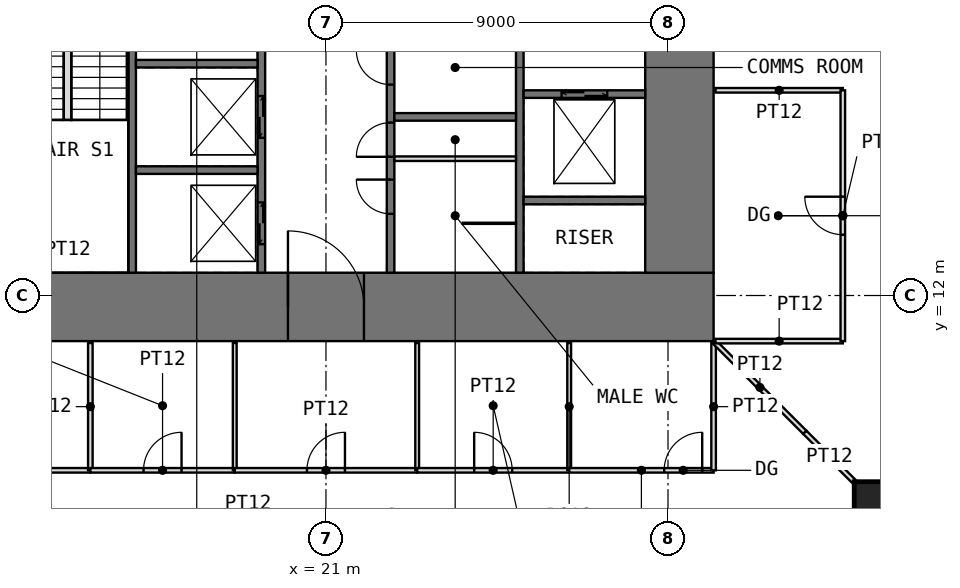
"""IFC4 building model, lengths in metres.
Left out: names, types, materials, properties, quantities, classifications, styles, units other than length and angle.
Written with IfcOpenShell. Run it as: python <this file> out.ifc"""

import sys

from ifc_helpers import new_model, si_unit, direction, frame, frame_2d, origin, origin_2d, place, context, subcontext, project, spatial, rectangle, extrude, element, fill, save


model = new_model("IFC4")
c1 = context("Model", 3, precision=1e-05, world=origin(), true_north=direction((0.0, 1.0)))
c2 = subcontext(c1, "Body", "Model", "MODEL_VIEW")
j1 = project(units=[si_unit("LENGTHUNIT", "METRE"), si_unit("PLANEANGLEUNIT", "RADIAN")], contexts=[c1])
p1 = place(None, origin())
s1 = spatial("IfcSite", under=j1, at=p1, CompositionType="ELEMENT")
p2 = place(p1, origin())
s2 = spatial("IfcBuilding", under=s1, at=p2, CompositionType="ELEMENT")
p3 = place(p2, frame((0.0, 0.0, 46.5)))
s3 = spatial("IfcBuildingStorey", under=s2, at=p3, CompositionType="ELEMENT", Elevation=46.5)
p4 = place(p3, frame((35.45, 6.55, 0.0), z_axis=(0.0, 0.0, 1.0), x_axis=(1.0, 0.0, 0.0)))
e1 = element("IfcColumn", 1, at=p4, inside=s3, PredefinedType="COLUMN", context=c2, shape_type="SweptSolid", body=[
    extrude(rectangle(XDim=1.1, YDim=1.1, at=origin_2d()), origin(), (0.0, 0.0, 1.0), 4.0),
])
p5 = place(p3, frame((10.8, 11.7, -0.05), z_axis=(0.0, 0.0, 1.0), x_axis=(1.0, 0.0, 0.0)))
e2 = element("IfcWall", 2, at=p5, inside=s3, PredefinedType="SHEAR", context=c2, shape_type="SweptSolid", body=[
    extrude(rectangle(XDim=20.4, YDim=1.8, at=frame_2d((10.2, 0.0))), origin(), (0.0, 0.0, 1.0), 4.0),
])
p6 = place(p5, frame((9.2, 0.0, 0.05)))
e3 = element("IfcOpeningElement", 3, at=p6, cuts=e2, PredefinedType="OPENING", context=c2, shape_type="SweptSolid", body=[
    extrude(rectangle(XDim=2.0, YDim=2.2, at=frame_2d((1.0, 1.1))), frame((0.0, 0.91, 0.0), z_axis=(0.0, -1.0, 0.0), x_axis=(1.0, 0.0, 0.0)), (0.0, 0.0, 1.0), 1.82),
])
p7 = place(p3, frame((30.3, 12.6, -0.05), z_axis=(0.0, 0.0, 1.0), x_axis=(0.0, 1.0, 0.0)))
e4 = element("IfcWall", 4, at=p7, inside=s3, PredefinedType="SHEAR", context=c2, shape_type="SweptSolid", body=[
    extrude(rectangle(XDim=16.8, YDim=1.8, at=frame_2d((8.4, 0.0))), origin(), (0.0, 0.0, 1.0), 4.0),
])
p8 = place(p7, frame((5.9, 0.0, 0.05)))
e5 = element("IfcOpeningElement", 5, at=p8, cuts=e4, PredefinedType="OPENING", context=c2, shape_type="SweptSolid", body=[
    extrude(rectangle(XDim=1.0, YDim=2.2, at=frame_2d((0.5, 1.1))), frame((0.0, 0.91, 0.0), z_axis=(0.0, -1.0, 0.0), x_axis=(1.0, 0.0, 0.0)), (0.0, 0.0, 1.0), 1.82),
])
p9 = place(p3, frame((15.9, 12.6, -0.05), z_axis=(0.0, 0.0, 1.0), x_axis=(0.0, 1.0, 0.0)))
e6 = element("IfcWall", 6, at=p9, inside=s3, PredefinedType="SHEAR", context=c2, shape_type="SweptSolid", body=[
    extrude(rectangle(XDim=16.8, YDim=0.2, at=frame_2d((8.4, 0.0))), origin(), (0.0, 0.0, 1.0), 4.0),
])
p10 = place(p9, frame((8.9, 0.0, 0.05)))
e7 = element("IfcOpeningElement", 7, at=p10, cuts=e6, PredefinedType="OPENING", context=c2, shape_type="SweptSolid", body=[
    extrude(rectangle(XDim=1.0, YDim=2.2, at=frame_2d((0.5, 1.1))), frame((0.0, 0.11, 0.0), z_axis=(0.0, -1.0, 0.0), x_axis=(1.0, 0.0, 0.0)), (0.0, 0.0, 1.0), 0.22),
])
p11 = place(p3, frame((19.3, 12.6, -0.05), z_axis=(0.0, 0.0, 1.0), x_axis=(0.0, 1.0, 0.0)))
e8 = element("IfcWall", 8, at=p11, inside=s3, PredefinedType="SHEAR", context=c2, shape_type="SweptSolid", body=[
    extrude(rectangle(XDim=16.8, YDim=0.2, at=frame_2d((8.4, 0.0))), origin(), (0.0, 0.0, 1.0), 4.0),
])
p12 = place(p11, frame((8.7, 0.0, 0.05)))
e9 = element("IfcOpeningElement", 9, at=p12, cuts=e8, PredefinedType="OPENING", context=c2, shape_type="SweptSolid", body=[
    extrude(rectangle(XDim=1.0, YDim=2.2, at=frame_2d((0.5, 1.1))), frame((0.0, 0.11, 0.0), z_axis=(0.0, -1.0, 0.0), x_axis=(1.0, 0.0, 0.0)), (0.0, 0.0, 1.0), 0.22),
])
p13 = place(p11, frame((10.85, 0.0, 0.05)))
e10 = element("IfcOpeningElement", 10, at=p13, cuts=e8, PredefinedType="OPENING", context=c2, shape_type="SweptSolid", body=[
    extrude(rectangle(XDim=0.9, YDim=2.2, at=frame_2d((0.45, 1.1))), frame((0.0, 0.11, 0.0), z_axis=(0.0, -1.0, 0.0), x_axis=(1.0, 0.0, 0.0)), (0.0, 0.0, 1.0), 0.22),
])
p14 = place(p11, frame((13.3, 0.0, 0.05)))
e11 = element("IfcOpeningElement", 11, at=p14, cuts=e8, PredefinedType="OPENING", context=c2, shape_type="SweptSolid", body=[
    extrude(rectangle(XDim=1.0, YDim=2.2, at=frame_2d((0.5, 1.1))), frame((0.0, 0.11, 0.0), z_axis=(0.0, -1.0, 0.0), x_axis=(1.0, 0.0, 0.0)), (0.0, 0.0, 1.0), 0.22),
])
p15 = place(p11, frame((15.55, 0.0, 0.05)))
e12 = element("IfcOpeningElement", 12, at=p15, cuts=e8, PredefinedType="OPENING", context=c2, shape_type="SweptSolid", body=[
    extrude(rectangle(XDim=0.9, YDim=2.2, at=frame_2d((0.45, 1.1))), frame((0.0, 0.11, 0.0), z_axis=(0.0, -1.0, 0.0), x_axis=(1.0, 0.0, 0.0)), (0.0, 0.0, 1.0), 0.22),
])
p16 = place(p11, frame((0.75, 0.0, 0.05)))
e13 = element("IfcOpeningElement", 13, at=p16, cuts=e8, PredefinedType="OPENING", context=c2, shape_type="SweptSolid", body=[
    extrude(rectangle(XDim=1.1, YDim=2.2, at=frame_2d((0.55, 1.1))), frame((0.0, 0.11, 0.0), z_axis=(0.0, -1.0, 0.0), x_axis=(1.0, 0.0, 0.0)), (0.0, 0.0, 1.0), 0.22),
])
p17 = place(p11, frame((3.55, 0.0, 0.05)))
e14 = element("IfcOpeningElement", 14, at=p17, cuts=e8, PredefinedType="OPENING", context=c2, shape_type="SweptSolid", body=[
    extrude(rectangle(XDim=1.1, YDim=2.2, at=frame_2d((0.55, 1.1))), frame((0.0, 0.11, 0.0), z_axis=(0.0, -1.0, 0.0), x_axis=(1.0, 0.0, 0.0)), (0.0, 0.0, 1.0), 0.22),
])
p18 = place(p11, frame((6.35, 0.0, 0.05)))
e15 = element("IfcOpeningElement", 15, at=p18, cuts=e8, PredefinedType="OPENING", context=c2, shape_type="SweptSolid", body=[
    extrude(rectangle(XDim=1.1, YDim=2.2, at=frame_2d((0.55, 1.1))), frame((0.0, 0.11, 0.0), z_axis=(0.0, -1.0, 0.0), x_axis=(1.0, 0.0, 0.0)), (0.0, 0.0, 1.0), 0.22),
])
p19 = place(p3, frame((22.7, 12.6, -0.05), z_axis=(0.0, 0.0, 1.0), x_axis=(0.0, 1.0, 0.0)))
e16 = element("IfcWall", 16, at=p19, inside=s3, PredefinedType="SHEAR", context=c2, shape_type="SweptSolid", body=[
    extrude(rectangle(XDim=16.8, YDim=0.2, at=frame_2d((8.4, 0.0))), origin(), (0.0, 0.0, 1.0), 4.0),
])
p20 = place(p19, frame((3.05, 0.0, 0.05)))
e17 = element("IfcOpeningElement", 17, at=p20, cuts=e16, PredefinedType="OPENING", context=c2, shape_type="SweptSolid", body=[
    extrude(rectangle(XDim=0.9, YDim=2.2, at=frame_2d((0.45, 1.1))), frame((0.0, 0.11, 0.0), z_axis=(0.0, -1.0, 0.0), x_axis=(1.0, 0.0, 0.0)), (0.0, 0.0, 1.0), 0.22),
])
p21 = place(p19, frame((7.1, 0.0, 0.05)))
e18 = element("IfcOpeningElement", 18, at=p21, cuts=e16, PredefinedType="OPENING", context=c2, shape_type="SweptSolid", body=[
    extrude(rectangle(XDim=1.0, YDim=2.2, at=frame_2d((0.5, 1.1))), frame((0.0, 0.11, 0.0), z_axis=(0.0, -1.0, 0.0), x_axis=(1.0, 0.0, 0.0)), (0.0, 0.0, 1.0), 0.22),
])
p22 = place(p19, frame((1.55, 0.0, 0.05)))
e19 = element("IfcOpeningElement", 19, at=p22, cuts=e16, PredefinedType="OPENING", context=c2, shape_type="SweptSolid", body=[
    extrude(rectangle(XDim=0.9, YDim=2.2, at=frame_2d((0.45, 1.1))), frame((0.0, 0.11, 0.0), z_axis=(0.0, -1.0, 0.0), x_axis=(1.0, 0.0, 0.0)), (0.0, 0.0, 1.0), 0.22),
])
p23 = place(p19, frame((4.95, 0.0, 0.05)))
e20 = element("IfcOpeningElement", 20, at=p23, cuts=e16, PredefinedType="OPENING", context=c2, shape_type="SweptSolid", body=[
    extrude(rectangle(XDim=0.9, YDim=2.2, at=frame_2d((0.45, 1.1))), frame((0.0, 0.11, 0.0), z_axis=(0.0, -1.0, 0.0), x_axis=(1.0, 0.0, 0.0)), (0.0, 0.0, 1.0), 0.22),
])
p24 = place(p3, frame((26.1, 12.6, -0.05), z_axis=(0.0, 0.0, 1.0), x_axis=(0.0, 1.0, 0.0)))
e21 = element("IfcWall", 21, at=p24, inside=s3, PredefinedType="SHEAR", context=c2, shape_type="SweptSolid", body=[
    extrude(rectangle(XDim=16.8, YDim=0.2, at=frame_2d((8.4, 0.0))), origin(), (0.0, 0.0, 1.0), 4.0),
])
p25 = place(p24, frame((6.9, 0.0, 0.05)))
e22 = element("IfcOpeningElement", 22, at=p25, cuts=e21, PredefinedType="OPENING", context=c2, shape_type="SweptSolid", body=[
    extrude(rectangle(XDim=1.0, YDim=2.2, at=frame_2d((0.5, 1.1))), frame((0.0, 0.11, 0.0), z_axis=(0.0, -1.0, 0.0), x_axis=(1.0, 0.0, 0.0)), (0.0, 0.0, 1.0), 0.22),
])
for number, where, z_axis, x_axis in (
    (23, (16.0, 15.3, -0.05), (0.0, 0.0, 1.0), (1.0, 0.0, 0.0)),
    (24, (16.0, 18.1, -0.05), (0.0, 0.0, 1.0), (1.0, 0.0, 0.0)),
    (25, (22.8, 16.7, -0.05), (0.0, 0.0, 1.0), (1.0, 0.0, 0.0)),
    (26, (26.2, 14.5, -0.05), (0.0, 0.0, 1.0), (1.0, 0.0, 0.0)),
):
    element("IfcWall", number, at=place(p3, frame(where, z_axis=z_axis, x_axis=x_axis)), inside=s3, PredefinedType="SHEAR", context=c2, shape_type="SweptSolid", body=[
        extrude(rectangle(XDim=3.2, YDim=0.2, at=frame_2d((1.6, 0.0))), origin(), (0.0, 0.0, 1.0), 4.0),
    ])
p26 = place(p3, frame((26.2, 17.3, -0.05), z_axis=(0.0, 0.0, 1.0), x_axis=(1.0, 0.0, 0.0)))
e27 = element("IfcWall", 27, at=p26, inside=s3, PredefinedType="SHEAR", context=c2, shape_type="SweptSolid", body=[
    extrude(rectangle(XDim=3.2, YDim=0.2, at=frame_2d((1.6, 0.0))), origin(), (0.0, 0.0, 1.0), 4.0),
])
p27 = place(p26, frame((1.0, 0.0, 0.05)))
e28 = element("IfcOpeningElement", 28, at=p27, cuts=e27, PredefinedType="OPENING", context=c2, shape_type="SweptSolid", body=[
    extrude(rectangle(XDim=1.2, YDim=2.2, at=frame_2d((0.6, 1.1))), frame((0.0, 0.11, 0.0), z_axis=(0.0, -1.0, 0.0), x_axis=(1.0, 0.0, 0.0)), (0.0, 0.0, 1.0), 0.22),
])
p28 = place(p3, frame((22.8, 15.6, 0.0), z_axis=(0.0, 0.0, 1.0), x_axis=(1.0, 0.0, 0.0)))
e29 = element("IfcWall", 29, at=p28, inside=s3, PredefinedType="PARTITIONING", context=c2, shape_type="SweptSolid", body=[
    extrude(rectangle(XDim=3.2, YDim=0.12, at=frame_2d((1.6, 0.0))), origin(), (0.0, 0.0, 1.0), 3.75),
])
p29 = place(p3, frame((24.6, 13.9, 0.0), z_axis=(0.0, 0.0, 1.0), x_axis=(1.0, 0.0, 0.0)))
e30 = element("IfcWall", 30, at=p29, inside=s3, PredefinedType="PARTITIONING", context=c2, shape_type="SweptSolid", body=[
    extrude(rectangle(XDim=1.4, YDim=0.03, at=frame_2d((0.7, 0.0))), origin(), (0.0, 0.0, 1.0), 3.75),
])
p30 = place(p3, frame((10.8, 7.4, 0.0), z_axis=(0.0, 0.0, 1.0), x_axis=(1.0, 0.0, 0.0)))
e31 = element("IfcWall", 31, at=p30, inside=s3, PredefinedType="PARTITIONING", context=c2, shape_type="SweptSolid", body=[
    extrude(rectangle(XDim=4.0, YDim=0.12, at=frame_2d((2.0, 0.0))), origin(), (0.0, 0.0, 1.0), 3.75),
])
p31 = place(p30, frame((1.5, 0.0, 0.0)))
e32 = element("IfcOpeningElement", 32, at=p31, cuts=e31, PredefinedType="OPENING", context=c2, shape_type="SweptSolid", body=[
    extrude(rectangle(XDim=1.0, YDim=2.4, at=frame_2d((0.5, 1.2))), frame((0.0, 0.07, 0.0), z_axis=(0.0, -1.0, 0.0), x_axis=(1.0, 0.0, 0.0)), (0.0, 0.0, 1.0), 0.14),
])
p32 = place(p3, frame((14.8, 7.4, 0.0), z_axis=(0.0, 0.0, 1.0), x_axis=(0.0, 1.0, 0.0)))
e33 = element("IfcWall", 33, at=p32, inside=s3, PredefinedType="PARTITIONING", context=c2, shape_type="SweptSolid", body=[
    extrude(rectangle(XDim=3.35, YDim=0.12, at=frame_2d((1.675, 0.0))), origin(), (0.0, 0.0, 1.0), 3.75),
])
p33 = place(p3, frame((14.8, 7.4, 0.0), z_axis=(0.0, 0.0, 1.0), x_axis=(1.0, 0.0, 0.0)))
e34 = element("IfcWall", 34, at=p33, inside=s3, PredefinedType="PARTITIONING", context=c2, shape_type="SweptSolid", body=[
    extrude(rectangle(XDim=3.8, YDim=0.12, at=frame_2d((1.9, 0.0))), origin(), (0.0, 0.0, 1.0), 3.75),
])
p34 = place(p33, frame((1.4, 0.0, 0.0)))
e35 = element("IfcOpeningElement", 35, at=p34, cuts=e34, PredefinedType="OPENING", context=c2, shape_type="SweptSolid", body=[
    extrude(rectangle(XDim=1.0, YDim=2.4, at=frame_2d((0.5, 1.2))), frame((0.0, 0.07, 0.0), z_axis=(0.0, -1.0, 0.0), x_axis=(1.0, 0.0, 0.0)), (0.0, 0.0, 1.0), 0.14),
])
p35 = place(p3, frame((18.6, 7.4, 0.0), z_axis=(0.0, 0.0, 1.0), x_axis=(0.0, 1.0, 0.0)))
e36 = element("IfcWall", 36, at=p35, inside=s3, PredefinedType="PARTITIONING", context=c2, shape_type="SweptSolid", body=[
    extrude(rectangle(XDim=3.35, YDim=0.1, at=frame_2d((1.675, 0.0))), origin(), (0.0, 0.0, 1.0), 3.75),
])
p36 = place(p3, frame((18.6, 7.4, 0.0), z_axis=(0.0, 0.0, 1.0), x_axis=(1.0, 0.0, 0.0)))
e37 = element("IfcWall", 37, at=p36, inside=s3, PredefinedType="PARTITIONING", context=c2, shape_type="SweptSolid", body=[
    extrude(rectangle(XDim=4.8, YDim=0.12, at=frame_2d((2.4, 0.0))), origin(), (0.0, 0.0, 1.0), 3.75),
])
p37 = place(p36, frame((1.9, 0.0, 0.0)))
e38 = element("IfcOpeningElement", 38, at=p37, cuts=e37, PredefinedType="OPENING", context=c2, shape_type="SweptSolid", body=[
    extrude(rectangle(XDim=1.0, YDim=2.4, at=frame_2d((0.5, 1.2))), frame((0.0, 0.07, 0.0), z_axis=(0.0, -1.0, 0.0), x_axis=(1.0, 0.0, 0.0)), (0.0, 0.0, 1.0), 0.14),
])
p38 = place(p3, frame((23.4, 7.4, 0.0), z_axis=(0.0, 0.0, 1.0), x_axis=(0.0, 1.0, 0.0)))
e39 = element("IfcWall", 39, at=p38, inside=s3, PredefinedType="PARTITIONING", context=c2, shape_type="SweptSolid", body=[
    extrude(rectangle(XDim=3.35, YDim=0.1, at=frame_2d((1.675, 0.0))), origin(), (0.0, 0.0, 1.0), 3.75),
])
p39 = place(p3, frame((23.4, 7.4, 0.0), z_axis=(0.0, 0.0, 1.0), x_axis=(1.0, 0.0, 0.0)))
e40 = element("IfcWall", 40, at=p39, inside=s3, PredefinedType="PARTITIONING", context=c2, shape_type="SweptSolid", body=[
    extrude(rectangle(XDim=4.0, YDim=0.12, at=frame_2d((2.0, 0.0))), origin(), (0.0, 0.0, 1.0), 3.75),
])
p40 = place(p39, frame((1.5, 0.0, 0.0)))
e41 = element("IfcOpeningElement", 41, at=p40, cuts=e40, PredefinedType="OPENING", context=c2, shape_type="SweptSolid", body=[
    extrude(rectangle(XDim=1.0, YDim=2.4, at=frame_2d((0.5, 1.2))), frame((0.0, 0.07, 0.0), z_axis=(0.0, -1.0, 0.0), x_axis=(1.0, 0.0, 0.0)), (0.0, 0.0, 1.0), 0.14),
])
p41 = place(p3, frame((27.4, 7.4, 0.0), z_axis=(0.0, 0.0, 1.0), x_axis=(0.0, 1.0, 0.0)))
e42 = element("IfcWall", 42, at=p41, inside=s3, PredefinedType="PARTITIONING", context=c2, shape_type="SweptSolid", body=[
    extrude(rectangle(XDim=3.35, YDim=0.1, at=frame_2d((1.675, 0.0))), origin(), (0.0, 0.0, 1.0), 3.75),
])
p42 = place(p3, frame((27.4, 7.4, 0.0), z_axis=(0.0, 0.0, 1.0), x_axis=(1.0, 0.0, 0.0)))
e43 = element("IfcWall", 43, at=p42, inside=s3, PredefinedType="PARTITIONING", context=c2, shape_type="SweptSolid", body=[
    extrude(rectangle(XDim=3.8, YDim=0.12, at=frame_2d((1.9, 0.0))), origin(), (0.0, 0.0, 1.0), 3.75),
])
p43 = place(p42, frame((2.5, 0.0, 0.0)))
e44 = element("IfcOpeningElement", 44, at=p43, cuts=e43, PredefinedType="OPENING", context=c2, shape_type="SweptSolid", body=[
    extrude(rectangle(XDim=1.0, YDim=2.4, at=frame_2d((0.5, 1.2))), frame((0.0, 0.07, 0.0), z_axis=(0.0, -1.0, 0.0), x_axis=(1.0, 0.0, 0.0)), (0.0, 0.0, 1.0), 0.14),
])
p44 = place(p3, frame((31.2, 7.4, 0.0), z_axis=(0.0, 0.0, 1.0), x_axis=(0.0, 1.0, 0.0)))
e45 = element("IfcWall", 45, at=p44, inside=s3, PredefinedType="PARTITIONING", context=c2, shape_type="SweptSolid", body=[
    extrude(rectangle(XDim=3.35, YDim=0.12, at=frame_2d((1.675, 0.0))), origin(), (0.0, 0.0, 1.0), 3.75),
])
p45 = place(p3, frame((31.235, 10.765, 0.0), z_axis=(0.0, 0.0, 1.0), x_axis=(0.707106781187, -0.707106781187, 0.0)))
e46 = element("IfcWall", 46, at=p45, inside=s3, PredefinedType="PARTITIONING", context=c2, shape_type="SweptSolid", body=[
    extrude(rectangle(XDim=3.346, YDim=0.12, at=frame_2d((1.673, 0.0))), origin(), (0.0, 0.0, 1.0), 3.75),
])
for number, where, z_axis, x_axis in (
    (47, (31.25, 10.8, 0.0), (0.0, 0.0, 1.0), (1.0, 0.0, 0.0)),
    (48, (31.25, 17.4, 0.0), (0.0, 0.0, 1.0), (1.0, 0.0, 0.0)),
):
    element("IfcWall", number, at=place(p3, frame(where, z_axis=z_axis, x_axis=x_axis)), inside=s3, PredefinedType="PARTITIONING", context=c2, shape_type="SweptSolid", body=[
        extrude(rectangle(XDim=3.35, YDim=0.12, at=frame_2d((1.675, 0.0))), origin(), (0.0, 0.0, 1.0), 3.75),
    ])
p46 = place(p3, frame((33.602, 8.398, 0.0), z_axis=(0.0, 0.0, 1.0), x_axis=(0.707106781187, -0.707106781187, 0.0)))
e49 = element("IfcWall", 49, at=p46, inside=s3, PredefinedType="PARTITIONING", context=c2, shape_type="SweptSolid", body=[
    extrude(rectangle(XDim=1.822, YDim=0.12, at=frame_2d((0.911, 0.0))), origin(), (0.0, 0.0, 1.0), 3.75),
])
p47 = place(p3, frame((34.6, 10.8, 0.0), z_axis=(0.0, 0.0, 1.0), x_axis=(0.0, 1.0, 0.0)))
e50 = element("IfcWall", 50, at=p47, inside=s3, PredefinedType="PARTITIONING", context=c2, shape_type="SweptSolid", body=[
    extrude(rectangle(XDim=6.6, YDim=0.12, at=frame_2d((3.3, 0.0))), origin(), (0.0, 0.0, 1.0), 3.75),
])
p48 = place(p47, frame((2.8, 0.0, 0.0)))
e51 = element("IfcOpeningElement", 51, at=p48, cuts=e50, PredefinedType="OPENING", context=c2, shape_type="SweptSolid", body=[
    extrude(rectangle(XDim=1.0, YDim=2.4, at=frame_2d((0.5, 1.2))), frame((0.0, 0.07, 0.0), z_axis=(0.0, -1.0, 0.0), x_axis=(1.0, 0.0, 0.0)), (0.0, 0.0, 1.0), 0.14),
])
p49 = place(p3, frame((14.2, 16.62, 0.0), z_axis=(0.0, 0.0, 1.0), x_axis=(0.0, 1.0, 0.0)))
e52 = element("IfcWall", 52, at=p49, inside=s3, PredefinedType="PARTITIONING", context=c2, shape_type="SweptSolid", body=[
    extrude(rectangle(XDim=3.08, YDim=0.2, at=frame_2d((1.54, 0.0))), origin(), (0.0, 0.0, 1.0), 4.0),
])
p50 = place(p6, origin())
e53 = element("IfcDoor", 53, at=p50, inside=s3, OperationType="DOUBLE_DOOR_SINGLE_SWING", PredefinedType="DOOR", context=c2, shape_type="SweptSolid", body=[
    extrude(rectangle(XDim=2.0, YDim=2.2, at=frame_2d((1.0, 1.1))), frame((0.0, 0.025, 0.0), z_axis=(0.0, -1.0, 0.0), x_axis=(1.0, 0.0, 0.0)), (0.0, 0.0, 1.0), 0.05),
])
fill(e3, e53)
p51 = place(p20, origin())
e54 = element("IfcDoor", 54, at=p51, inside=s3, OperationType="SINGLE_SWING_LEFT", PredefinedType="DOOR", context=c2, shape_type="SweptSolid", body=[
    extrude(rectangle(XDim=0.9, YDim=2.2, at=frame_2d((0.45, 1.1))), frame((0.0, 0.025, 0.0), z_axis=(0.0, -1.0, 0.0), x_axis=(1.0, 0.0, 0.0)), (0.0, 0.0, 1.0), 0.05),
])
fill(e17, e54)
p52 = place(p22, origin())
e55 = element("IfcDoor", 55, at=p52, inside=s3, OperationType="SINGLE_SWING_RIGHT", PredefinedType="DOOR", context=c2, shape_type="SweptSolid", body=[
    extrude(rectangle(XDim=0.9, YDim=2.2, at=frame_2d((0.45, 1.1))), frame((0.0, 0.025, 0.0), z_axis=(0.0, -1.0, 0.0), x_axis=(1.0, 0.0, 0.0)), (0.0, 0.0, 1.0), 0.05),
])
fill(e19, e55)
p53 = place(p23, origin())
e56 = element("IfcDoor", 56, at=p53, inside=s3, OperationType="SINGLE_SWING_RIGHT", PredefinedType="DOOR", context=c2, shape_type="SweptSolid", body=[
    extrude(rectangle(XDim=0.9, YDim=2.2, at=frame_2d((0.45, 1.1))), frame((0.0, 0.025, 0.0), z_axis=(0.0, -1.0, 0.0), x_axis=(1.0, 0.0, 0.0)), (0.0, 0.0, 1.0), 0.05),
])
fill(e20, e56)
p54 = place(p34, origin())
e57 = element("IfcDoor", 57, at=p54, inside=s3, OperationType="SINGLE_SWING_RIGHT", PredefinedType="DOOR", context=c2, shape_type="SweptSolid", body=[
    extrude(rectangle(XDim=1.0, YDim=2.4, at=frame_2d((0.5, 1.2))), frame((0.0, 0.025, 0.0), z_axis=(0.0, -1.0, 0.0), x_axis=(1.0, 0.0, 0.0)), (0.0, 0.0, 1.0), 0.05),
])
fill(e35, e57)
p55 = place(p40, origin())
e58 = element("IfcDoor", 58, at=p55, inside=s3, OperationType="SINGLE_SWING_LEFT", PredefinedType="DOOR", context=c2, shape_type="SweptSolid", body=[
    extrude(rectangle(XDim=1.0, YDim=2.4, at=frame_2d((0.5, 1.2))), frame((0.0, 0.025, 0.0), z_axis=(0.0, -1.0, 0.0), x_axis=(1.0, 0.0, 0.0)), (0.0, 0.0, 1.0), 0.05),
])
fill(e41, e58)
p56 = place(p48, origin())
e59 = element("IfcDoor", 59, at=p56, inside=s3, OperationType="SINGLE_SWING_RIGHT", PredefinedType="DOOR", context=c2, shape_type="SweptSolid", body=[
    extrude(rectangle(XDim=1.0, YDim=2.4, at=frame_2d((0.5, 1.2))), frame((0.0, 0.025, 0.0), z_axis=(0.0, -1.0, 0.0), x_axis=(1.0, 0.0, 0.0)), (0.0, 0.0, 1.0), 0.05),
])
fill(e51, e59)
p57 = place(p37, origin())
e60 = element("IfcDoor", 60, at=p57, inside=s3, OperationType="SINGLE_SWING_RIGHT", PredefinedType="DOOR", context=c2, shape_type="SweptSolid", body=[
    extrude(rectangle(XDim=1.0, YDim=2.4, at=frame_2d((0.5, 1.2))), frame((0.0, 0.025, 0.0), z_axis=(0.0, -1.0, 0.0), x_axis=(1.0, 0.0, 0.0)), (0.0, 0.0, 1.0), 0.05),
])
fill(e38, e60)
p58 = place(p43, origin())
e61 = element("IfcDoor", 61, at=p58, inside=s3, OperationType="SINGLE_SWING_RIGHT", PredefinedType="DOOR", context=c2, shape_type="SweptSolid", body=[
    extrude(rectangle(XDim=1.0, YDim=2.4, at=frame_2d((0.5, 1.2))), frame((0.0, 0.025, 0.0), z_axis=(0.0, -1.0, 0.0), x_axis=(1.0, 0.0, 0.0)), (0.0, 0.0, 1.0), 0.05),
])
fill(e44, e61)
p59 = place(p16, origin())
e62 = element("IfcDoor", 62, at=p59, inside=s3, OperationType="DOUBLE_DOOR_SLIDING", PredefinedType="DOOR", context=c2, shape_type="SweptSolid", body=[
    extrude(rectangle(XDim=1.1, YDim=2.2, at=frame_2d((0.55, 1.1))), frame((0.0, 0.025, 0.0), z_axis=(0.0, -1.0, 0.0), x_axis=(1.0, 0.0, 0.0)), (0.0, 0.0, 1.0), 0.05),
])
fill(e13, e62)
p60 = place(p17, origin())
e63 = element("IfcDoor", 63, at=p60, inside=s3, OperationType="DOUBLE_DOOR_SLIDING", PredefinedType="DOOR", context=c2, shape_type="SweptSolid", body=[
    extrude(rectangle(XDim=1.1, YDim=2.2, at=frame_2d((0.55, 1.1))), frame((0.0, 0.025, 0.0), z_axis=(0.0, -1.0, 0.0), x_axis=(1.0, 0.0, 0.0)), (0.0, 0.0, 1.0), 0.05),
])
fill(e14, e63)
p61 = place(p27, origin())
e64 = element("IfcDoor", 64, at=p61, inside=s3, OperationType="DOUBLE_DOOR_SLIDING", PredefinedType="DOOR", context=c2, shape_type="SweptSolid", body=[
    extrude(rectangle(XDim=1.2, YDim=2.2, at=frame_2d((0.6, 1.1))), frame((0.0, 0.025, 0.0), z_axis=(0.0, -1.0, 0.0), x_axis=(1.0, 0.0, 0.0)), (0.0, 0.0, 1.0), 0.05),
])
fill(e28, e64)
save(model, sys.argv[1])
